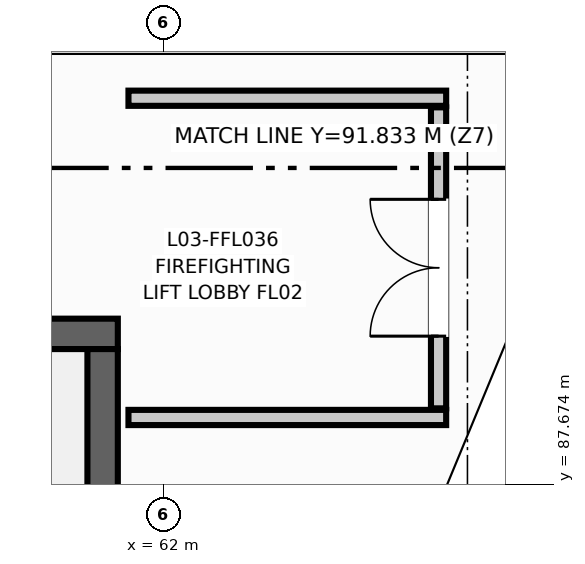
"""IFC4 building model, lengths in metres.
Left out: names, types, materials, properties, quantities, classifications, styles, units other than length and angle.
Written with IfcOpenShell. Run it as: python <this file> out.ifc"""

import sys

from ifc_helpers import new_model, si_unit, direction, frame, frame_2d, origin, place, context, subcontext, project, spatial, rectangle, extrude, element, fill, save


model = new_model("IFC4")
c1 = context("Model", 3, precision=1e-05, world=origin(), true_north=direction((0.0, 1.0)))
c2 = subcontext(c1, "Body", "Model", "MODEL_VIEW")
j1 = project(units=[si_unit("LENGTHUNIT", "METRE"), si_unit("PLANEANGLEUNIT", "RADIAN")], contexts=[c1])
p1 = place(None, origin())
s1 = spatial("IfcSite", under=j1, at=p1, CompositionType="ELEMENT")
p2 = place(p1, origin())
s2 = spatial("IfcBuilding", under=s1, at=p2, CompositionType="ELEMENT")
p3 = place(p2, frame((0.0, 0.0, 13.5)))
s3 = spatial("IfcBuildingStorey", under=s2, at=p3, CompositionType="ELEMENT", Elevation=13.5)
p4 = place(p3, frame((55.6, 89.65, 0.0), z_axis=(0.0, 0.0, 1.0), x_axis=(1.0, 0.0, 0.0)))
e1 = element("IfcWall", 1, at=p4, inside=s3, PredefinedType="SHEAR", context=c2, shape_type="SweptSolid", body=[
    extrude(rectangle(XDim=5.8, YDim=0.4, at=frame_2d((2.9, 0.0))), origin(), (0.0, 0.0, 1.0), 4.25),
])
p5 = place(p3, frame((61.2, 80.55, 0.0), z_axis=(0.0, 0.0, 1.0), x_axis=(0.0, 1.0, 0.0)))
e2 = element("IfcWall", 2, at=p5, inside=s3, PredefinedType="SHEAR", context=c2, shape_type="SweptSolid", body=[
    extrude(rectangle(XDim=8.9, YDim=0.4, at=frame_2d((4.45, 0.0))), origin(), (0.0, 0.0, 1.0), 4.25),
])
p6 = place(p5, frame((0.4, 0.0, 0.0)))
e3 = element("IfcOpeningElement", 3, at=p6, cuts=e2, PredefinedType="OPENING", context=c2, shape_type="SweptSolid", body=[
    extrude(rectangle(XDim=1.2, YDim=2.2, at=frame_2d((0.6, 1.1))), frame((0.0, 0.21, 0.0), z_axis=(0.0, -1.0, 0.0), x_axis=(1.0, 0.0, 0.0)), (0.0, 0.0, 1.0), 0.42),
])
for number, where, z_axis, x_axis in (
    (4, (61.54, 88.55, 0.0), (0.0, 0.0, 1.0), (1.0, 0.0, 0.0)),
    (5, (61.54, 92.75, 0.0), (0.0, 0.0, 1.0), (1.0, 0.0, 0.0)),
):
    element("IfcWall", number, at=place(p3, frame(where, z_axis=z_axis, x_axis=x_axis)), inside=s3, PredefinedType="PARTITIONING", context=c2, shape_type="SweptSolid", body=[
        extrude(rectangle(XDim=4.18, YDim=0.2, at=frame_2d((2.09, 0.0))), origin(), (0.0, 0.0, 1.0), 3.22),
    ])
p7 = place(p3, frame((65.62, 88.67, 0.0), z_axis=(0.0, 0.0, 1.0), x_axis=(0.0, 1.0, 0.0)))
e6 = element("IfcWall", 6, at=p7, inside=s3, PredefinedType="PARTITIONING", context=c2, shape_type="SweptSolid", body=[
    extrude(rectangle(XDim=3.96, YDim=0.2, at=frame_2d((1.98, 0.0))), origin(), (0.0, 0.0, 1.0), 3.22),
])
p8 = place(p7, frame((0.95, 0.0, 0.0)))
e7 = element("IfcOpeningElement", 7, at=p8, cuts=e6, PredefinedType="OPENING", context=c2, shape_type="SweptSolid", body=[
    extrude(rectangle(XDim=1.8, YDim=2.2, at=frame_2d((0.9, 1.1))), frame((0.0, 0.11, 0.0), z_axis=(0.0, -1.0, 0.0), x_axis=(1.0, 0.0, 0.0)), (0.0, 0.0, 1.0), 0.22),
])
p9 = place(p8, origin())
e8 = element("IfcDoor", 8, at=p9, inside=s3, OperationType="DOUBLE_DOOR_SINGLE_SWING", PredefinedType="DOOR", context=c2, shape_type="SweptSolid", body=[
    extrude(rectangle(XDim=1.8, YDim=2.2, at=frame_2d((0.9, 1.1))), frame((0.0, 0.025, 0.0), z_axis=(0.0, -1.0, 0.0), x_axis=(1.0, 0.0, 0.0)), (0.0, 0.0, 1.0), 0.05),
])
fill(e7, e8)
save(model, sys.argv[1])
